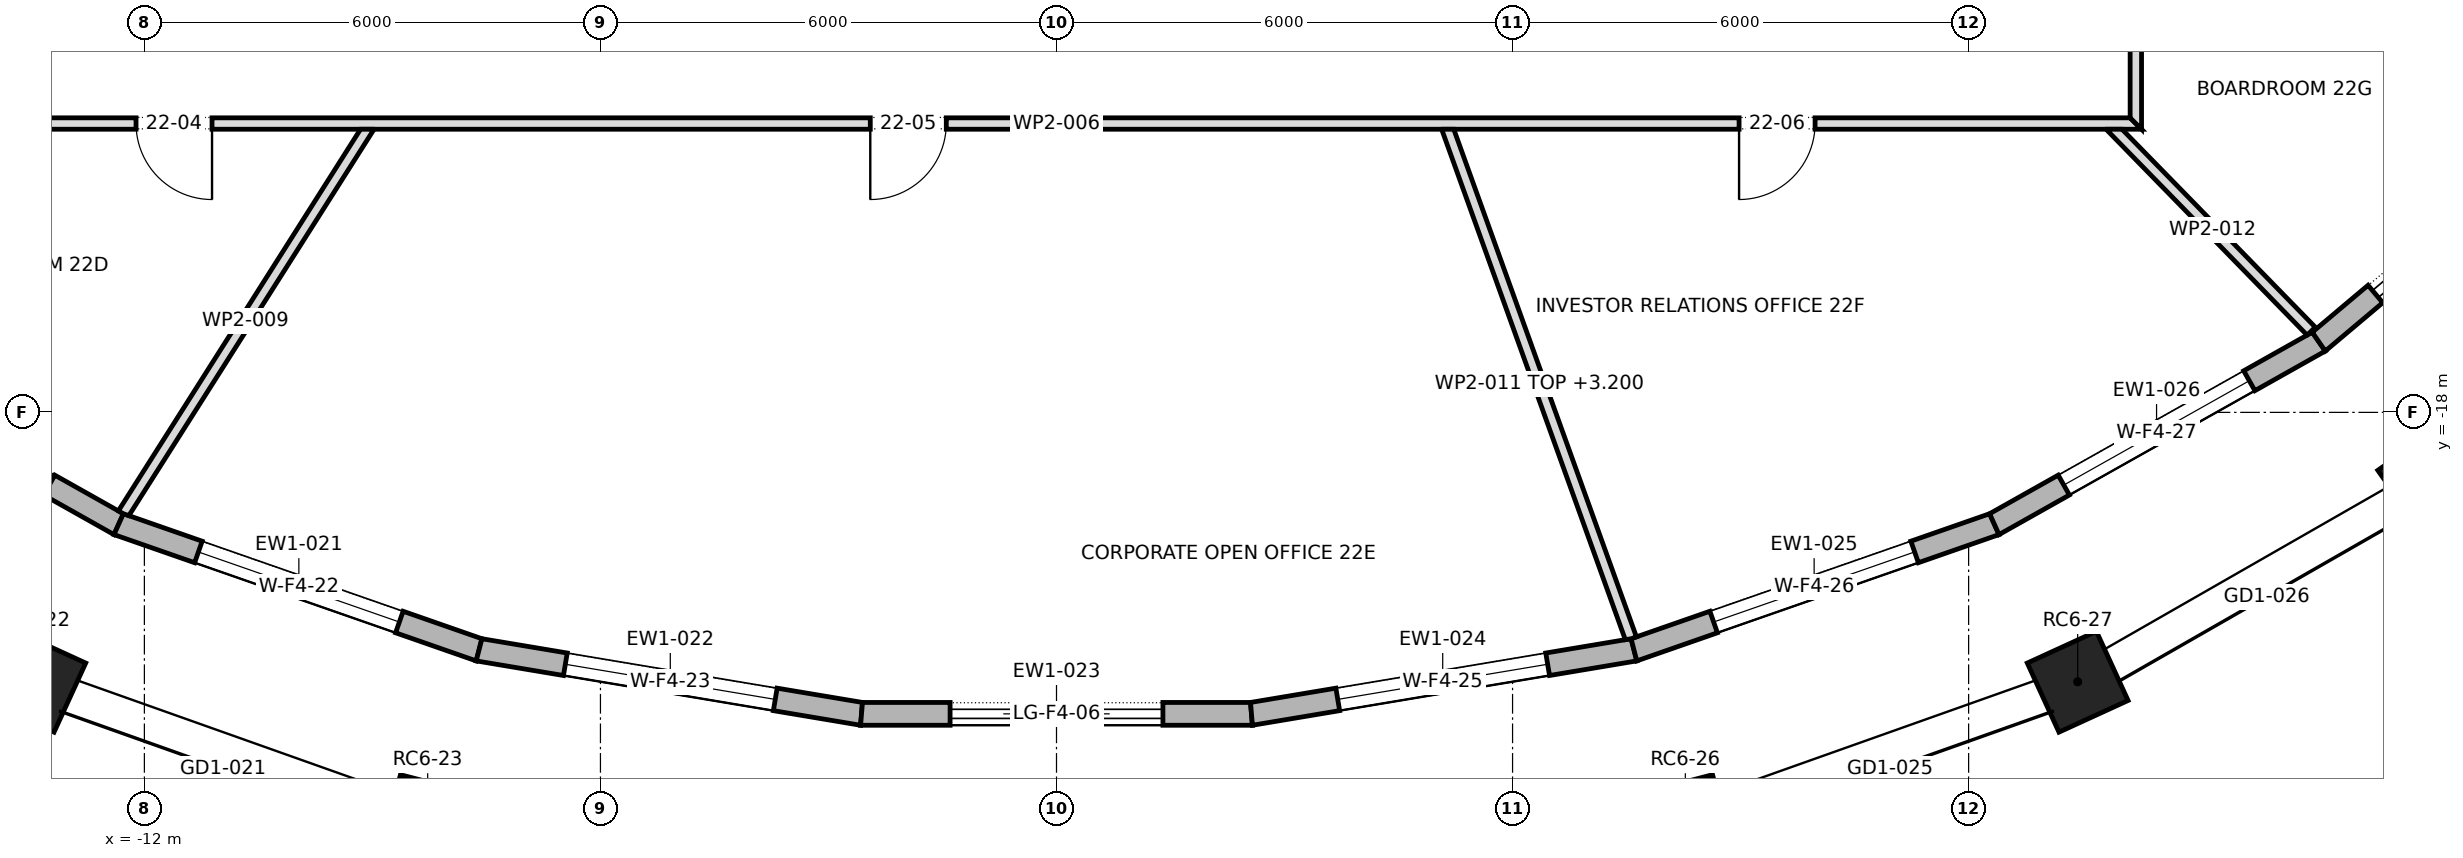
"""IFC4 building model, lengths in metres.
Left out: names, types, materials, properties, quantities, classifications, styles, units other than length and angle.
Written with IfcOpenShell. Run it as: python <this file> out.ifc"""

import sys

from ifc_helpers import new_model, si_unit, direction, frame, frame_2d, origin, origin_2d, place, context, subcontext, project, spatial, polyline, rectangle, outline, extrude, element, fill, save


model = new_model("IFC4")
c1 = context("Model", 3, precision=1e-05, world=origin(), true_north=direction((0.0, 1.0)))
c2 = subcontext(c1, "Body", "Model", "MODEL_VIEW")
j1 = project(units=[si_unit("LENGTHUNIT", "METRE"), si_unit("PLANEANGLEUNIT", "RADIAN")], contexts=[c1])
p1 = place(None, origin())
s1 = spatial("IfcSite", under=j1, at=p1, CompositionType="ELEMENT")
p2 = place(p1, origin())
s2 = spatial("IfcBuilding", under=s1, at=p2, CompositionType="ELEMENT")
p3 = place(p2, frame((0.0, 0.0, 312.3)))
s3 = spatial("IfcBuildingStorey", under=s2, at=p3, CompositionType="ELEMENT", Elevation=312.3)
for number, where, z_axis, x_axis in (
    (1, (-13.435, -21.544, 0.0), (0.0, 0.0, 1.0), (0.909, -0.417, 0.0)),
    (2, (-8.273, -23.377, 0.0), (0.0, 0.0, 1.0), (0.968, -0.252, 0.0)),
    (3, (8.273, -23.377, 0.0), (0.0, 0.0, 1.0), (0.968, 0.252, 0.0)),
    (4, (13.435, -21.544, 0.0), (0.0, 0.0, 1.0), (0.909, 0.417, 0.0)),
    (5, (18.08, -18.884, 0.0), (0.0, 0.0, 1.0), (0.818, 0.575, 0.0)),
):
    element("IfcColumn", number, at=place(p3, frame(where, z_axis=z_axis, x_axis=x_axis)), inside=s3, PredefinedType="COLUMN", context=c2, shape_type="SweptSolid", body=[
        extrude(rectangle(XDim=1.0, YDim=1.0, at=origin_2d()), origin(), (0.0, 0.0, 1.0), 4.0),
    ])
p4 = place(p3, frame((-16.607, -17.07, 0.0), z_axis=(0.0, 0.0, 1.0), x_axis=(0.871570211895, -0.490270706588, 0.0)))
e6 = element("IfcWall", 6, at=p4, inside=s3, PredefinedType="STANDARD", context=c2, shape_type="SweptSolid", body=[
    extrude(outline(polyline([(-0.014, -0.15), (4.911, -0.15), (4.884, 0.15), (0.014, 0.15), (-0.014, -0.15)])), origin(), (0.0, 0.0, 1.0), 3.7),
])
p5 = place(p4, frame((1.049, 0.0, 0.6)))
e7 = element("IfcOpeningElement", 7, at=p5, cuts=e6, PredefinedType="OPENING", context=c2, shape_type="SweptSolid", body=[
    extrude(rectangle(XDim=2.8, YDim=2.65, at=frame_2d((1.4, 1.325))), frame((0.0, 0.162, 0.0), z_axis=(0.0, -1.0, 0.0), x_axis=(1.0, 0.0, 0.0)), (0.0, 0.0, 1.0), 0.324),
])
p6 = place(p3, frame((-12.338, -19.471, 0.0), z_axis=(0.0, 0.0, 1.0), x_axis=(0.944251863618, -0.329223963365, 0.0)))
e8 = element("IfcWall", 8, at=p6, inside=s3, PredefinedType="STANDARD", context=c2, shape_type="SweptSolid", body=[
    extrude(outline(polyline([(-0.013, -0.15), (5.034, -0.15), (5.009, 0.15), (0.013, 0.15), (-0.013, -0.15)])), origin(), (0.0, 0.0, 1.0), 3.7),
])
p7 = place(p6, frame((1.111, 0.0, 0.6)))
e9 = element("IfcOpeningElement", 9, at=p7, cuts=e8, PredefinedType="OPENING", context=c2, shape_type="SweptSolid", body=[
    extrude(rectangle(XDim=2.8, YDim=2.65, at=frame_2d((1.4, 1.325))), frame((0.0, 0.162, 0.0), z_axis=(0.0, -1.0, 0.0), x_axis=(1.0, 0.0, 0.0)), (0.0, 0.0, 1.0), 0.324),
])
p8 = place(p3, frame((-7.597, -21.124, 0.0), z_axis=(0.0, 0.0, 1.0), x_axis=(0.986269480969, -0.165143909695, 0.0)))
e10 = element("IfcWall", 10, at=p8, inside=s3, PredefinedType="STANDARD", context=c2, shape_type="SweptSolid", body=[
    extrude(outline(polyline([(-0.013, -0.15), (5.114, -0.15), (5.089, 0.15), (0.013, 0.15), (-0.013, -0.15)])), origin(), (0.0, 0.0, 1.0), 3.7),
])
p9 = place(p8, frame((1.151, 0.0, 0.6)))
e11 = element("IfcOpeningElement", 11, at=p9, cuts=e10, PredefinedType="OPENING", context=c2, shape_type="SweptSolid", body=[
    extrude(rectangle(XDim=2.8, YDim=2.65, at=frame_2d((1.4, 1.325))), frame((0.0, 0.162, 0.0), z_axis=(0.0, -1.0, 0.0), x_axis=(1.0, 0.0, 0.0)), (0.0, 0.0, 1.0), 0.324),
])
p10 = place(p3, frame((-2.565, -21.966, 0.0), z_axis=(0.0, 0.0, 1.0), x_axis=(1.0, 0.0, 0.0)))
e12 = element("IfcWall", 12, at=p10, inside=s3, PredefinedType="STANDARD", context=c2, shape_type="SweptSolid", body=[
    extrude(outline(polyline([(-0.012, -0.15), (5.143, -0.15), (5.118, 0.15), (0.012, 0.15), (-0.012, -0.15)])), origin(), (0.0, 0.0, 1.0), 3.7),
])
p11 = place(p10, frame((1.165, 0.0, 0.0)))
e13 = element("IfcOpeningElement", 13, at=p11, cuts=e12, PredefinedType="OPENING", context=c2, shape_type="SweptSolid", body=[
    extrude(rectangle(XDim=2.8, YDim=3.25, at=frame_2d((1.4, 1.625))), frame((0.0, 0.162, 0.0), z_axis=(0.0, -1.0, 0.0), x_axis=(1.0, 0.0, 0.0)), (0.0, 0.0, 1.0), 0.324),
])
p12 = place(p3, frame((2.565, -21.966, 0.0), z_axis=(0.0, 0.0, 1.0), x_axis=(0.986269480969, 0.165143909695, 0.0)))
e14 = element("IfcWall", 14, at=p12, inside=s3, PredefinedType="STANDARD", context=c2, shape_type="SweptSolid", body=[
    extrude(outline(polyline([(-0.012, -0.15), (5.115, -0.15), (5.089, 0.15), (0.012, 0.15), (-0.012, -0.15)])), origin(), (0.0, 0.0, 1.0), 3.7),
])
p13 = place(p12, frame((1.151, 0.0, 0.6)))
e15 = element("IfcOpeningElement", 15, at=p13, cuts=e14, PredefinedType="OPENING", context=c2, shape_type="SweptSolid", body=[
    extrude(rectangle(XDim=2.8, YDim=2.65, at=frame_2d((1.4, 1.325))), frame((0.0, 0.162, 0.0), z_axis=(0.0, -1.0, 0.0), x_axis=(1.0, 0.0, 0.0)), (0.0, 0.0, 1.0), 0.324),
])
p14 = place(p3, frame((7.597, -21.124, 0.0), z_axis=(0.0, 0.0, 1.0), x_axis=(0.944251863618, 0.329223963365, 0.0)))
e16 = element("IfcWall", 16, at=p14, inside=s3, PredefinedType="STANDARD", context=c2, shape_type="SweptSolid", body=[
    extrude(outline(polyline([(-0.013, -0.15), (5.034, -0.15), (5.008, 0.15), (0.013, 0.15), (-0.013, -0.15)])), origin(), (0.0, 0.0, 1.0), 3.7),
])
p15 = place(p14, frame((1.111, 0.0, 0.6)))
e17 = element("IfcOpeningElement", 17, at=p15, cuts=e16, PredefinedType="OPENING", context=c2, shape_type="SweptSolid", body=[
    extrude(rectangle(XDim=2.8, YDim=2.65, at=frame_2d((1.4, 1.325))), frame((0.0, 0.162, 0.0), z_axis=(0.0, -1.0, 0.0), x_axis=(1.0, 0.0, 0.0)), (0.0, 0.0, 1.0), 0.324),
])
p16 = place(p3, frame((12.338, -19.471, 0.0), z_axis=(0.0, 0.0, 1.0), x_axis=(0.871570211895, 0.490270706588, 0.0)))
e18 = element("IfcWall", 18, at=p16, inside=s3, PredefinedType="STANDARD", context=c2, shape_type="SweptSolid", body=[
    extrude(outline(polyline([(-0.013, -0.15), (4.912, -0.15), (4.883, 0.15), (0.013, 0.15), (-0.013, -0.15)])), origin(), (0.0, 0.0, 1.0), 3.7),
])
p17 = place(p16, frame((1.049, 0.0, 0.6)))
e19 = element("IfcOpeningElement", 19, at=p17, cuts=e18, PredefinedType="OPENING", context=c2, shape_type="SweptSolid", body=[
    extrude(rectangle(XDim=2.8, YDim=2.65, at=frame_2d((1.4, 1.325))), frame((0.0, 0.162, 0.0), z_axis=(0.0, -1.0, 0.0), x_axis=(1.0, 0.0, 0.0)), (0.0, 0.0, 1.0), 0.324),
])
p18 = place(p3, frame((16.607, -17.07, 0.0), z_axis=(0.0, 0.0, 1.0), x_axis=(0.765059193792, 0.643959959931, 0.0)))
e20 = element("IfcWall", 20, at=p18, inside=s3, PredefinedType="STANDARD", context=c2, shape_type="SweptSolid", body=[
    extrude(outline(polyline([(-0.014, -0.15), (4.763, -0.15), (4.733, 0.15), (0.014, 0.15), (-0.014, -0.15)])), origin(), (0.0, 0.0, 1.0), 3.7),
])
p19 = place(p18, frame((0.974, 0.0, 0.0)))
e21 = element("IfcOpeningElement", 21, at=p19, cuts=e20, PredefinedType="OPENING", context=c2, shape_type="SweptSolid", body=[
    extrude(rectangle(XDim=2.8, YDim=3.25, at=frame_2d((1.4, 1.625))), frame((0.0, 0.162, 0.0), z_axis=(0.0, -1.0, 0.0), x_axis=(1.0, 0.0, 0.0)), (0.0, 0.0, 1.0), 0.324),
])
p20 = place(p3, frame((-14.275, -14.2, 0.0), z_axis=(0.0, 0.0, 1.0), x_axis=(1.0, 0.0, 0.0)))
e22 = element("IfcWall", 22, at=p20, inside=s3, PredefinedType="PARTITIONING", context=c2, shape_type="SweptSolid", body=[
    extrude(outline(polyline([(28.55, -0.075), (28.55, -0.075), (28.4, 0.075), (26.517, 0.075), (24.633, 0.075), (22.75, 0.075), (20.866, 0.075), (18.983, 0.075), (17.1, 0.075), (15.217, 0.075), (13.333, 0.075), (11.45, 0.075), (9.567, 0.075), (7.683, 0.075), (5.8, 0.075), (3.917, 0.075), (2.033, 0.075), (0.15, 0.075), (0.0, -0.075), (1.903, -0.075), (3.807, -0.075), (5.71, -0.075), (7.613, -0.075), (9.517, -0.075), (11.42, -0.075), (13.323, -0.075), (15.227, -0.075), (17.13, -0.075), (19.033, -0.075), (20.937, -0.075), (22.84, -0.075), (24.743, -0.075), (26.646, -0.075), (28.55, -0.075)])), origin(), (0.0, 0.0, 1.0), 3.7),
])
p21 = place(p20, frame((2.165, 0.0, 0.0)))
e23 = element("IfcOpeningElement", 23, at=p21, cuts=e22, PredefinedType="OPENING", context=c2, shape_type="SweptSolid", body=[
    extrude(rectangle(XDim=1.0, YDim=2.1, at=frame_2d((0.5, 1.05))), frame((0.0, 0.087, 0.0), z_axis=(0.0, -1.0, 0.0), x_axis=(1.0, 0.0, 0.0)), (0.0, 0.0, 1.0), 0.174),
])
p22 = place(p20, frame((11.825, 0.0, 0.0)))
e24 = element("IfcOpeningElement", 24, at=p22, cuts=e22, PredefinedType="OPENING", context=c2, shape_type="SweptSolid", body=[
    extrude(rectangle(XDim=1.0, YDim=2.1, at=frame_2d((0.5, 1.05))), frame((0.0, 0.087, 0.0), z_axis=(0.0, -1.0, 0.0), x_axis=(1.0, 0.0, 0.0)), (0.0, 0.0, 1.0), 0.174),
])
p23 = place(p20, frame((23.255, 0.0, 0.0)))
e25 = element("IfcOpeningElement", 25, at=p23, cuts=e22, PredefinedType="OPENING", context=c2, shape_type="SweptSolid", body=[
    extrude(rectangle(XDim=1.0, YDim=2.1, at=frame_2d((0.5, 1.05))), frame((0.0, 0.087, 0.0), z_axis=(0.0, -1.0, 0.0), x_axis=(1.0, 0.0, 0.0)), (0.0, 0.0, 1.0), 0.174),
])
p24 = place(p3, frame((-9.042, -14.235, 0.0), z_axis=(0.0, 0.0, 1.0), x_axis=(-0.535766262989, -0.844366337228, 0.0)))
e26 = element("IfcWall", 26, at=p24, inside=s3, PredefinedType="PARTITIONING", context=c2, shape_type="SweptSolid", body=[
    extrude(outline(polyline([(6.041, -0.075), (6.041, -0.067), (6.037, 0.001), (6.02, 0.075), (4.515, 0.075), (3.01, 0.075), (1.505, 0.075), (0.0, 0.075), (0.0, 0.074), (0.095, -0.075), (2.077, -0.075), (4.059, -0.075), (6.041, -0.075)])), origin(), (0.0, 0.0, 1.0), 3.7),
])
p25 = place(p3, frame((5.138, -14.25, 0.0), z_axis=(0.0, 0.0, 1.0), x_axis=(0.338519975389, -0.940959205419, 0.0)))
e27 = element("IfcWall", 27, at=p25, inside=s3, PredefinedType="PARTITIONING", context=c2, shape_type="SweptSolid", body=[
    extrude(outline(polyline([(0.0, -0.075), (1.784, -0.075), (3.568, -0.075), (5.353, -0.075), (7.137, -0.075), (7.15, 0.001), (7.151, 0.019), (7.151, 0.075), (5.376, 0.075), (3.602, 0.075), (1.828, 0.075), (0.053, 0.075), (0.0, -0.074), (0.0, -0.075)])), origin(), (0.0, 0.0, 1.0), 3.2),
])
p26 = place(p3, frame((13.862, -14.223, 0.0), z_axis=(0.0, 0.0, 1.0), x_axis=(0.698607487782, -0.715505120887, 0.0)))
e28 = element("IfcWall", 28, at=p26, inside=s3, PredefinedType="PARTITIONING", context=c2, shape_type="SweptSolid", body=[
    extrude(outline(polyline([(3.785, 0.075), (1.966, 0.075), (0.146, 0.075), (0.0, -0.074), (0.0, -0.075), (1.893, -0.075), (3.785, -0.075), (3.785, 0.075)])), origin(), (0.0, 0.0, 1.0), 3.7),
])
p27 = place(p3, frame((14.2, -14.275, 0.0), z_axis=(0.0, 0.0, 1.0), x_axis=(0.0, 1.0, 0.0)))
e29 = element("IfcWall", 29, at=p27, inside=s3, PredefinedType="PARTITIONING", context=c2, shape_type="SweptSolid", body=[
    extrude(outline(polyline([(28.55, -0.075), (28.55, -0.075), (28.4, 0.075), (26.517, 0.075), (24.633, 0.075), (22.75, 0.075), (20.866, 0.075), (18.983, 0.075), (17.1, 0.075), (15.217, 0.075), (13.333, 0.075), (11.45, 0.075), (9.567, 0.075), (7.683, 0.075), (5.8, 0.075), (3.917, 0.075), (2.033, 0.075), (0.15, 0.075), (0.0, -0.075), (1.903, -0.075), (3.807, -0.075), (5.71, -0.075), (7.613, -0.075), (9.517, -0.075), (11.42, -0.075), (13.323, -0.075), (15.227, -0.075), (17.13, -0.075), (19.033, -0.075), (20.937, -0.075), (22.84, -0.075), (24.743, -0.075), (26.646, -0.075), (28.55, -0.075)])), origin(), (0.0, 0.0, 1.0), 3.7),
])
p28 = place(p27, frame((3.48, 0.0, 0.0)))
e30 = element("IfcOpeningElement", 30, at=p28, cuts=e29, PredefinedType="OPENING", context=c2, shape_type="SweptSolid", body=[
    extrude(rectangle(XDim=1.0, YDim=2.1, at=frame_2d((0.5, 1.05))), frame((0.0, 0.087, 0.0), z_axis=(0.0, -1.0, 0.0), x_axis=(1.0, 0.0, 0.0)), (0.0, 0.0, 1.0), 0.174),
])
p29 = place(p27, frame((9.99, 0.0, 0.0)))
e31 = element("IfcOpeningElement", 31, at=p29, cuts=e29, PredefinedType="OPENING", context=c2, shape_type="SweptSolid", body=[
    extrude(rectangle(XDim=1.0, YDim=2.1, at=frame_2d((0.5, 1.05))), frame((0.0, 0.087, 0.0), z_axis=(0.0, -1.0, 0.0), x_axis=(1.0, 0.0, 0.0)), (0.0, 0.0, 1.0), 0.174),
])
p30 = place(p27, frame((15.0, 0.0, 0.0)))
e32 = element("IfcOpeningElement", 32, at=p30, cuts=e29, PredefinedType="OPENING", context=c2, shape_type="SweptSolid", body=[
    extrude(rectangle(XDim=1.0, YDim=2.1, at=frame_2d((0.5, 1.05))), frame((0.0, 0.087, 0.0), z_axis=(0.0, -1.0, 0.0), x_axis=(1.0, 0.0, 0.0)), (0.0, 0.0, 1.0), 0.174),
])
p31 = place(p27, frame((20.495, 0.0, 0.0)))
e33 = element("IfcOpeningElement", 33, at=p31, cuts=e29, PredefinedType="OPENING", context=c2, shape_type="SweptSolid", body=[
    extrude(rectangle(XDim=1.0, YDim=2.1, at=frame_2d((0.5, 1.05))), frame((0.0, 0.087, 0.0), z_axis=(0.0, -1.0, 0.0), x_axis=(1.0, 0.0, 0.0)), (0.0, 0.0, 1.0), 0.174),
])
p32 = place(p7, origin())
e34 = element("IfcWindow", 34, at=p32, inside=s3, PartitioningType="DOUBLE_PANEL_VERTICAL", PredefinedType="WINDOW", context=c2, shape_type="SweptSolid", body=[
    extrude(rectangle(XDim=2.8, YDim=2.65, at=frame_2d((1.4, 1.325))), frame((0.0, 0.03, 0.0), z_axis=(0.0, -1.0, 0.0), x_axis=(1.0, 0.0, 0.0)), (0.0, 0.0, 1.0), 0.06),
])
fill(e9, e34)
p33 = place(p9, origin())
e35 = element("IfcWindow", 35, at=p33, inside=s3, PartitioningType="DOUBLE_PANEL_VERTICAL", PredefinedType="WINDOW", context=c2, shape_type="SweptSolid", body=[
    extrude(rectangle(XDim=2.8, YDim=2.65, at=frame_2d((1.4, 1.325))), frame((0.0, 0.03, 0.0), z_axis=(0.0, -1.0, 0.0), x_axis=(1.0, 0.0, 0.0)), (0.0, 0.0, 1.0), 0.06),
])
fill(e11, e35)
p34 = place(p11, origin())
e36 = element("IfcDoor", 36, at=p34, inside=s3, OperationType="DOUBLE_DOOR_SLIDING", PredefinedType="DOOR", context=c2, shape_type="SweptSolid", body=[
    extrude(rectangle(XDim=2.8, YDim=3.25, at=frame_2d((1.4, 1.625))), frame((0.0, 0.025, 0.0), z_axis=(0.0, -1.0, 0.0), x_axis=(1.0, 0.0, 0.0)), (0.0, 0.0, 1.0), 0.05),
])
fill(e13, e36)
p35 = place(p13, origin())
e37 = element("IfcWindow", 37, at=p35, inside=s3, PartitioningType="DOUBLE_PANEL_VERTICAL", PredefinedType="WINDOW", context=c2, shape_type="SweptSolid", body=[
    extrude(rectangle(XDim=2.8, YDim=2.65, at=frame_2d((1.4, 1.325))), frame((0.0, 0.03, 0.0), z_axis=(0.0, -1.0, 0.0), x_axis=(1.0, 0.0, 0.0)), (0.0, 0.0, 1.0), 0.06),
])
fill(e15, e37)
p36 = place(p15, origin())
e38 = element("IfcWindow", 38, at=p36, inside=s3, PartitioningType="DOUBLE_PANEL_VERTICAL", PredefinedType="WINDOW", context=c2, shape_type="SweptSolid", body=[
    extrude(rectangle(XDim=2.8, YDim=2.65, at=frame_2d((1.4, 1.325))), frame((0.0, 0.03, 0.0), z_axis=(0.0, -1.0, 0.0), x_axis=(1.0, 0.0, 0.0)), (0.0, 0.0, 1.0), 0.06),
])
fill(e17, e38)
p37 = place(p17, origin())
e39 = element("IfcWindow", 39, at=p37, inside=s3, PartitioningType="DOUBLE_PANEL_VERTICAL", PredefinedType="WINDOW", context=c2, shape_type="SweptSolid", body=[
    extrude(rectangle(XDim=2.8, YDim=2.65, at=frame_2d((1.4, 1.325))), frame((0.0, 0.03, 0.0), z_axis=(0.0, -1.0, 0.0), x_axis=(1.0, 0.0, 0.0)), (0.0, 0.0, 1.0), 0.06),
])
fill(e19, e39)
p38 = place(p19, origin())
e40 = element("IfcDoor", 40, at=p38, inside=s3, OperationType="DOUBLE_DOOR_SLIDING", PredefinedType="DOOR", context=c2, shape_type="SweptSolid", body=[
    extrude(rectangle(XDim=2.8, YDim=3.25, at=frame_2d((1.4, 1.625))), frame((0.0, 0.025, 0.0), z_axis=(0.0, -1.0, 0.0), x_axis=(1.0, 0.0, 0.0)), (0.0, 0.0, 1.0), 0.05),
])
fill(e21, e40)
p39 = place(p21, frame((1.0, 0.0, 0.0), z_axis=(0.0, 0.0, 1.0), x_axis=(-1.0, 0.0, 0.0)))
e41 = element("IfcDoor", 41, at=p39, inside=s3, OperationType="SINGLE_SWING_RIGHT", PredefinedType="DOOR", context=c2, shape_type="SweptSolid", body=[
    extrude(rectangle(XDim=1.0, YDim=2.1, at=frame_2d((0.5, 1.05))), frame((0.0, 0.025, 0.0), z_axis=(0.0, -1.0, 0.0), x_axis=(1.0, 0.0, 0.0)), (0.0, 0.0, 1.0), 0.05),
])
fill(e23, e41)
p40 = place(p22, frame((1.0, 0.0, 0.0), z_axis=(0.0, 0.0, 1.0), x_axis=(-1.0, 0.0, 0.0)))
e42 = element("IfcDoor", 42, at=p40, inside=s3, OperationType="SINGLE_SWING_LEFT", PredefinedType="DOOR", context=c2, shape_type="SweptSolid", body=[
    extrude(rectangle(XDim=1.0, YDim=2.1, at=frame_2d((0.5, 1.05))), frame((0.0, 0.025, 0.0), z_axis=(0.0, -1.0, 0.0), x_axis=(1.0, 0.0, 0.0)), (0.0, 0.0, 1.0), 0.05),
])
fill(e24, e42)
p41 = place(p23, frame((1.0, 0.0, 0.0), z_axis=(0.0, 0.0, 1.0), x_axis=(-1.0, 0.0, 0.0)))
e43 = element("IfcDoor", 43, at=p41, inside=s3, OperationType="SINGLE_SWING_LEFT", PredefinedType="DOOR", context=c2, shape_type="SweptSolid", body=[
    extrude(rectangle(XDim=1.0, YDim=2.1, at=frame_2d((0.5, 1.05))), frame((0.0, 0.025, 0.0), z_axis=(0.0, -1.0, 0.0), x_axis=(1.0, 0.0, 0.0)), (0.0, 0.0, 1.0), 0.05),
])
fill(e25, e43)
save(model, sys.argv[1])
